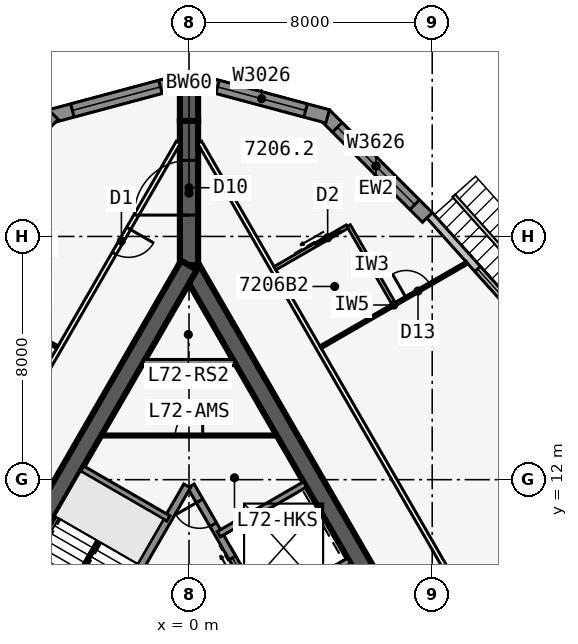
"""IFC4 building model, lengths in metres.
Left out: names, types, materials, properties, quantities, classifications, styles, units other than length and angle.
Written with IfcOpenShell. Run it as: python <this file> out.ifc"""

import sys

from ifc_helpers import new_model, si_unit, direction, frame, frame_2d, origin, place, context, subcontext, project, spatial, polyline, rectangle, outline, extrude, element, fill, save


model = new_model("IFC4")
c1 = context("Model", 3, precision=1e-05, world=origin(), true_north=direction((0.0, 1.0)))
c2 = subcontext(c1, "Body", "Model", "MODEL_VIEW")
j1 = project(units=[si_unit("LENGTHUNIT", "METRE"), si_unit("PLANEANGLEUNIT", "RADIAN")], contexts=[c1])
p1 = place(None, origin())
s1 = spatial("IfcSite", under=j1, at=p1, CompositionType="ELEMENT")
p2 = place(p1, origin())
s2 = spatial("IfcBuilding", under=s1, at=p2, CompositionType="ELEMENT")
p3 = place(p2, frame((0.0, 0.0, 271.7)))
s3 = spatial("IfcBuildingStorey", under=s2, at=p3, CompositionType="ELEMENT", Elevation=271.7)
p4 = place(p3, frame((16.5, -9.526, 0.0), z_axis=(0.0, 0.0, 1.0), x_axis=(-0.499999749417, 0.866025548458, 0.0)))
e1 = element("IfcWall", 1, at=p4, inside=s3, PredefinedType="SHEAR", context=c2, shape_type="SweptSolid", body=[
    extrude(rectangle(XDim=33.0, YDim=0.6, at=frame_2d((16.5, 0.0))), origin(), (0.0, 0.0, 1.0), 3.6),
])
p5 = place(p4, frame((14.15, 0.0, 0.0)))
e2 = element("IfcOpeningElement", 2, at=p5, cuts=e1, PredefinedType="OPENING", context=c2, shape_type="SweptSolid", body=[
    extrude(rectangle(XDim=1.8, YDim=2.13, at=frame_2d((0.9, 1.065))), frame((0.0, 0.31, 0.0), z_axis=(0.0, -1.0, 0.0), x_axis=(1.0, 0.0, 0.0)), (0.0, 0.0, 1.0), 0.62),
])
p6 = place(p4, frame((12.6, 0.0, 0.0)))
e3 = element("IfcOpeningElement", 3, at=p6, cuts=e1, PredefinedType="OPENING", context=c2, shape_type="SweptSolid", body=[
    extrude(rectangle(XDim=1.0, YDim=2.13, at=frame_2d((0.5, 1.065))), frame((0.0, 0.31, 0.0), z_axis=(0.0, -1.0, 0.0), x_axis=(1.0, 0.0, 0.0)), (0.0, 0.0, 1.0), 0.62),
])
p7 = place(p3, frame((5.379, 2.586, 0.0), z_axis=(0.0, 0.0, 1.0), x_axis=(-0.500001375892, 0.866024609411, 0.0)))
e4 = element("IfcWall", 4, at=p7, inside=s3, PredefinedType="SOLIDWALL", context=c2, shape_type="SweptSolid", body=[
    extrude(rectangle(XDim=10.633, YDim=0.25, at=frame_2d((5.316, 0.0))), origin(), (0.0, 0.0, 1.0), 3.35),
])
p8 = place(p7, frame((9.164, 0.0, 0.0)))
e5 = element("IfcOpeningElement", 5, at=p8, cuts=e4, PredefinedType="OPENING", context=c2, shape_type="SweptSolid", body=[
    extrude(rectangle(XDim=0.9, YDim=2.13, at=frame_2d((0.45, 1.065))), frame((0.0, 0.135, 0.0), z_axis=(0.0, -1.0, 0.0), x_axis=(1.0, 0.0, 0.0)), (0.0, 0.0, 1.0), 0.27),
])
p9 = place(p7, frame((1.0, 0.0, 0.0)))
e6 = element("IfcOpeningElement", 6, at=p9, cuts=e4, PredefinedType="OPENING", context=c2, shape_type="SweptSolid", body=[
    extrude(rectangle(XDim=1.1, YDim=2.13, at=frame_2d((0.55, 1.065))), frame((0.0, 0.135, 0.0), z_axis=(0.0, -1.0, 0.0), x_axis=(1.0, 0.0, 0.0)), (0.0, 0.0, 1.0), 0.27),
])
p10 = place(p7, frame((3.9, 0.0, 0.0)))
e7 = element("IfcOpeningElement", 7, at=p10, cuts=e4, PredefinedType="OPENING", context=c2, shape_type="SweptSolid", body=[
    extrude(rectangle(XDim=1.1, YDim=2.13, at=frame_2d((0.55, 1.065))), frame((0.0, 0.135, 0.0), z_axis=(0.0, -1.0, 0.0), x_axis=(1.0, 0.0, 0.0)), (0.0, 0.0, 1.0), 0.27),
])
p11 = place(p7, frame((6.8, 0.0, 0.0)))
e8 = element("IfcOpeningElement", 8, at=p11, cuts=e4, PredefinedType="OPENING", context=c2, shape_type="SweptSolid", body=[
    extrude(rectangle(XDim=1.1, YDim=2.13, at=frame_2d((0.55, 1.065))), frame((0.0, 0.135, 0.0), z_axis=(0.0, -1.0, 0.0), x_axis=(1.0, 0.0, 0.0)), (0.0, 0.0, 1.0), 0.27),
])
for number, where, z_axis, x_axis in (
    (9, (2.429, 7.696, 0.0), (0.0, 0.0, 1.0), (0.866, 0.5, 0.0)),
    (10, (0.979, 10.207, 0.0), (0.0, 0.0, 1.0), (0.866, 0.5, 0.0)),
):
    element("IfcWall", number, at=place(p3, frame(where, z_axis=z_axis, x_axis=x_axis)), inside=s3, PredefinedType="SOLIDWALL", context=c2, shape_type="SweptSolid", body=[
        extrude(rectangle(XDim=3.275, YDim=0.2, at=frame_2d((1.637, 0.0))), origin(), (0.0, 0.0, 1.0), 3.35),
    ])
p12 = place(p3, frame((0.0, 19.052, 0.0), z_axis=(0.0, 0.0, 1.0), x_axis=(-0.499999749417, -0.866025548458, 0.0)))
e11 = element("IfcWall", 11, at=p12, inside=s3, PredefinedType="SHEAR", context=c2, shape_type="SweptSolid", body=[
    extrude(rectangle(XDim=33.0, YDim=0.6, at=frame_2d((16.5, 0.0))), origin(), (0.0, 0.0, 1.0), 3.6),
])
p13 = place(p12, frame((14.15, 0.0, 0.0)))
e12 = element("IfcOpeningElement", 12, at=p13, cuts=e11, PredefinedType="OPENING", context=c2, shape_type="SweptSolid", body=[
    extrude(rectangle(XDim=1.8, YDim=2.13, at=frame_2d((0.9, 1.065))), frame((0.0, 0.31, 0.0), z_axis=(0.0, -1.0, 0.0), x_axis=(1.0, 0.0, 0.0)), (0.0, 0.0, 1.0), 0.62),
])
p14 = place(p12, frame((12.6, 0.0, 0.0)))
e13 = element("IfcOpeningElement", 13, at=p14, cuts=e11, PredefinedType="OPENING", context=c2, shape_type="SweptSolid", body=[
    extrude(rectangle(XDim=1.0, YDim=2.13, at=frame_2d((0.5, 1.065))), frame((0.0, 0.31, 0.0), z_axis=(0.0, -1.0, 0.0), x_axis=(1.0, 0.0, 0.0)), (0.0, 0.0, 1.0), 0.62),
])
p15 = place(p3, frame((-0.062, 11.794, 0.0), z_axis=(0.0, 0.0, 1.0), x_axis=(-0.500006680225, -0.86602154692, 0.0)))
e14 = element("IfcWall", 14, at=p15, inside=s3, PredefinedType="SOLIDWALL", context=c2, shape_type="SweptSolid", body=[
    extrude(rectangle(XDim=7.733, YDim=0.25, at=frame_2d((3.866, 0.0))), origin(), (0.0, 0.0, 1.0), 3.35),
])
p16 = place(p3, frame((-0.679, 10.727, 0.0), z_axis=(0.0, 0.0, 1.0), x_axis=(-0.866027924134, 0.499995634601, 0.0)))
e15 = element("IfcWall", 15, at=p16, inside=s3, PredefinedType="SOLIDWALL", context=c2, shape_type="SweptSolid", body=[
    extrude(rectangle(XDim=3.275, YDim=0.2, at=frame_2d((1.637, 0.0))), origin(), (0.0, 0.0, 1.0), 3.35),
])
p17 = place(p3, frame((0.0, 19.052, 0.0), z_axis=(0.0, 0.0, 1.0), x_axis=(0.0, 1.0, 0.0)))
e16 = element("IfcWall", 16, at=p17, inside=s3, PredefinedType="SHEAR", context=c2, shape_type="SweptSolid", body=[
    extrude(rectangle(XDim=4.746, YDim=0.6, at=frame_2d((2.373, 0.0))), origin(), (0.0, 0.0, 1.0), 3.6),
])
p18 = place(p17, frame((1.65, 0.0, 0.0)))
e17 = element("IfcOpeningElement", 17, at=p18, cuts=e16, PredefinedType="OPENING", context=c2, shape_type="SweptSolid", body=[
    extrude(rectangle(XDim=1.8, YDim=2.13, at=frame_2d((0.9, 1.065))), frame((0.0, 0.31, 0.0), z_axis=(0.0, -1.0, 0.0), x_axis=(1.0, 0.0, 0.0)), (0.0, 0.0, 1.0), 0.62),
])
p19 = place(p3, frame((0.0, 23.799, 0.0), z_axis=(0.0, 0.0, 1.0), x_axis=(0.0, 1.0, 0.0)))
e18 = element("IfcWall", 18, at=p19, inside=s3, PredefinedType="SHEAR", context=c2, shape_type="SweptSolid", body=[
    extrude(rectangle(XDim=1.155, YDim=0.6, at=frame_2d((0.577, 0.0))), origin(), (0.0, 0.0, 1.0), 3.6),
])
p20 = place(p3, frame((12.68, 15.374, 0.0), z_axis=(0.0, 0.0, 1.0), x_axis=(-0.667303550892, 0.744785855778, 0.0)))
e19 = element("IfcWall", 19, at=p20, inside=s3, PredefinedType="STANDARD", context=c2, shape_type="SweptSolid", body=[
    extrude(rectangle(XDim=7.153, YDim=0.25, at=frame_2d((3.576, 0.0))), origin(), (0.0, 0.0, 1.0), 3.35),
])
p21 = place(p20, frame((0.577, 0.0, 0.45)))
e20 = element("IfcOpeningElement", 20, at=p21, cuts=e19, PredefinedType="OPENING", context=c2, shape_type="SweptSolid", body=[
    extrude(rectangle(XDim=4.2, YDim=2.6, at=frame_2d((2.1, 1.3))), frame((0.0, 0.135, 0.0), z_axis=(0.0, -1.0, 0.0), x_axis=(1.0, 0.0, 0.0)), (0.0, 0.0, 1.0), 0.27),
])
p22 = place(p3, frame((7.841, 20.625, 0.0), z_axis=(0.0, 0.0, 1.0), x_axis=(-0.707106781187, 0.707106781187, 0.0)))
e21 = element("IfcWall", 21, at=p22, inside=s3, PredefinedType="SOLIDWALL", context=c2, shape_type="SweptSolid", body=[
    extrude(rectangle(XDim=4.781, YDim=0.45, at=frame_2d((2.391, 0.0))), origin(), (0.0, 0.0, 1.0), 3.35),
])
p23 = place(p22, frame((0.591, 0.0, 0.45)))
e22 = element("IfcOpeningElement", 22, at=p23, cuts=e21, PredefinedType="OPENING", context=c2, shape_type="SweptSolid", body=[
    extrude(rectangle(XDim=3.6, YDim=2.6, at=frame_2d((1.8, 1.3))), frame((0.0, 0.235, 0.0), z_axis=(0.0, -1.0, 0.0), x_axis=(1.0, 0.0, 0.0)), (0.0, 0.0, 1.0), 0.47),
])
p24 = place(p3, frame((4.561, 23.948, 0.0), z_axis=(0.0, 0.0, 1.0), x_axis=(-0.965926628191, 0.258816052347, 0.0)))
e23 = element("IfcWall", 23, at=p24, inside=s3, PredefinedType="SOLIDWALL", context=c2, shape_type="SweptSolid", body=[
    extrude(outline(polyline([(4.781, 0.225), (4.722, 0.225), (4.375, 0.132), (4.351, 0.225), (0.0, 0.225), (0.0, -0.225), (4.781, -0.225), (4.781, 0.225)])), origin(), (0.0, 0.0, 1.0), 3.35),
])
p25 = place(p24, frame((0.75, 0.0, 0.45)))
e24 = element("IfcOpeningElement", 24, at=p25, cuts=e23, PredefinedType="OPENING", context=c2, shape_type="SweptSolid", body=[
    extrude(rectangle(XDim=3.0, YDim=2.6, at=frame_2d((1.5, 1.3))), frame((0.0, 0.235, 0.0), z_axis=(0.0, -1.0, 0.0), x_axis=(1.0, 0.0, 0.0)), (0.0, 0.0, 1.0), 0.47),
])
p26 = place(p3, frame((0.058, 25.186, 0.0), z_axis=(0.0, 0.0, 1.0), x_axis=(-0.965926628191, -0.258816052347, 0.0)))
e25 = element("IfcWall", 25, at=p26, inside=s3, PredefinedType="SOLIDWALL", context=c2, shape_type="SweptSolid", body=[
    extrude(outline(polyline([(4.781, 0.225), (0.431, 0.225), (0.406, 0.132), (0.059, 0.225), (0.0, 0.225), (0.0, -0.225), (4.781, -0.225), (4.781, 0.225)])), origin(), (0.0, 0.0, 1.0), 3.35),
])
p27 = place(p26, frame((1.031, 0.0, 0.45)))
e26 = element("IfcOpeningElement", 26, at=p27, cuts=e25, PredefinedType="OPENING", context=c2, shape_type="SweptSolid", body=[
    extrude(rectangle(XDim=3.0, YDim=2.6, at=frame_2d((1.5, 1.3))), frame((0.0, 0.235, 0.0), z_axis=(0.0, -1.0, 0.0), x_axis=(1.0, 0.0, 0.0)), (0.0, 0.0, 1.0), 0.47),
])
p28 = place(p3, frame((-4.46, 24.007, 0.0), z_axis=(0.0, 0.0, 1.0), x_axis=(-0.707106781187, -0.707106781187, 0.0)))
e27 = element("IfcWall", 27, at=p28, inside=s3, PredefinedType="SOLIDWALL", context=c2, shape_type="SweptSolid", body=[
    extrude(rectangle(XDim=4.781, YDim=0.45, at=frame_2d((2.391, 0.0))), origin(), (0.0, 0.0, 1.0), 3.35),
])
p29 = place(p28, frame((0.591, 0.0, 0.45)))
e28 = element("IfcOpeningElement", 28, at=p29, cuts=e27, PredefinedType="OPENING", context=c2, shape_type="SweptSolid", body=[
    extrude(rectangle(XDim=3.6, YDim=2.6, at=frame_2d((1.8, 1.3))), frame((0.0, 0.235, 0.0), z_axis=(0.0, -1.0, 0.0), x_axis=(1.0, 0.0, 0.0)), (0.0, 0.0, 1.0), 0.47),
])
p30 = place(p3, frame((20.177, -11.245, 0.0), z_axis=(0.0, 0.0, 1.0), x_axis=(-0.499998875317, 0.866026053119, 0.0)))
e29 = element("IfcWall", 29, at=p30, inside=s3, PredefinedType="PARTITIONING", context=c2, shape_type="SweptSolid", body=[
    extrude(rectangle(XDim=39.654, YDim=0.15, at=frame_2d((19.827, 0.0))), origin(), (0.0, 0.0, 1.0), 3.35),
])
p31 = place(p30, frame((11.352, 0.0, 0.0)))
e30 = element("IfcOpeningElement", 30, at=p31, cuts=e29, PredefinedType="OPENING", context=c2, shape_type="SweptSolid", body=[
    extrude(rectangle(XDim=0.95, YDim=2.13, at=frame_2d((0.475, 1.065))), frame((0.0, 0.085, 0.0), z_axis=(0.0, -1.0, 0.0), x_axis=(1.0, 0.0, 0.0)), (0.0, 0.0, 1.0), 0.17),
])
p32 = place(p3, frame((4.329, 16.355, 0.0), z_axis=(0.0, 0.0, 1.0), x_axis=(0.866029066823, 0.499993655377, 0.0)))
e31 = element("IfcWall", 31, at=p32, inside=s3, PredefinedType="PARTITIONING", context=c2, shape_type="SweptSolid", body=[
    extrude(rectangle(XDim=5.559, YDim=0.1, at=frame_2d((2.779, 0.0))), origin(), (0.0, 0.0, 1.0), 2.301),
])
p33 = place(p32, frame((3.25, 0.0, 0.0)))
e32 = element("IfcOpeningElement", 32, at=p33, cuts=e31, PredefinedType="OPENING", context=c2, shape_type="SweptSolid", body=[
    extrude(rectangle(XDim=0.9, YDim=2.13, at=frame_2d((0.45, 1.065))), frame((0.0, 0.06, 0.0), z_axis=(0.0, -1.0, 0.0), x_axis=(1.0, 0.0, 0.0)), (0.0, 0.0, 1.0), 0.12),
])
p34 = place(p3, frame((6.753, 17.755, 0.0), z_axis=(0.0, 0.0, 1.0), x_axis=(-0.499990139034, 0.866031096941, 0.0)))
e33 = element("IfcWall", 33, at=p34, inside=s3, PredefinedType="PLUMBINGWALL", context=c2, shape_type="SweptSolid", body=[
    extrude(rectangle(XDim=3.0, YDim=0.12, at=frame_2d((1.5, 0.0))), origin(), (0.0, 0.0, 1.0), 3.35),
])
p35 = place(p3, frame((2.829, 18.954, 0.0), z_axis=(0.0, 0.0, 1.0), x_axis=(0.866035715982, 0.499982138324, 0.0)))
e34 = element("IfcWall", 34, at=p35, inside=s3, PredefinedType="PLUMBINGWALL", context=c2, shape_type="SweptSolid", body=[
    extrude(rectangle(XDim=2.74, YDim=0.12, at=frame_2d((1.37, 0.0))), origin(), (0.0, 0.0, 1.0), 3.35),
])
p36 = place(p35, frame((1.55, 0.0, 0.0)))
e35 = element("IfcOpeningElement", 35, at=p36, cuts=e34, PredefinedType="OPENING", context=c2, shape_type="SweptSolid", body=[
    extrude(rectangle(XDim=0.9, YDim=2.13, at=frame_2d((0.45, 1.065))), frame((0.0, 0.07, 0.0), z_axis=(0.0, -1.0, 0.0), x_axis=(1.0, 0.0, 0.0)), (0.0, 0.0, 1.0), 0.14),
])
p37 = place(p3, frame((-0.35, 23.096, 0.0), z_axis=(0.0, 0.0, 1.0), x_axis=(-0.499998875317, -0.866026053119, 0.0)))
e36 = element("IfcWall", 36, at=p37, inside=s3, PredefinedType="PARTITIONING", context=c2, shape_type="SweptSolid", body=[
    extrude(rectangle(XDim=39.654, YDim=0.15, at=frame_2d((19.827, 0.0))), origin(), (0.0, 0.0, 1.0), 3.35),
])
p38 = place(p37, frame((3.272, 0.0, 0.0)))
e37 = element("IfcOpeningElement", 37, at=p38, cuts=e36, PredefinedType="OPENING", context=c2, shape_type="SweptSolid", body=[
    extrude(rectangle(XDim=0.95, YDim=2.13, at=frame_2d((0.475, 1.065))), frame((0.0, 0.085, 0.0), z_axis=(0.0, -1.0, 0.0), x_axis=(1.0, 0.0, 0.0)), (0.0, 0.0, 1.0), 0.17),
])
p39 = place(p37, frame((19.052, 0.0, 0.0)))
e38 = element("IfcOpeningElement", 38, at=p39, cuts=e36, PredefinedType="OPENING", context=c2, shape_type="SweptSolid", body=[
    extrude(rectangle(XDim=0.95, YDim=2.13, at=frame_2d((0.475, 1.065))), frame((0.0, 0.085, 0.0), z_axis=(0.0, -1.0, 0.0), x_axis=(1.0, 0.0, 0.0)), (0.0, 0.0, 1.0), 0.17),
])
p40 = place(p37, frame((35.432, 0.0, 0.0)))
e39 = element("IfcOpeningElement", 39, at=p40, cuts=e36, PredefinedType="OPENING", context=c2, shape_type="SweptSolid", body=[
    extrude(rectangle(XDim=0.95, YDim=2.13, at=frame_2d((0.475, 1.065))), frame((0.0, 0.085, 0.0), z_axis=(0.0, -1.0, 0.0), x_axis=(1.0, 0.0, 0.0)), (0.0, 0.0, 1.0), 0.17),
])
p41 = place(p3, frame((-4.329, 16.355, 0.0), z_axis=(0.0, 0.0, 1.0), x_axis=(-0.866029066823, 0.499993655377, 0.0)))
e40 = element("IfcWall", 40, at=p41, inside=s3, PredefinedType="PARTITIONING", context=c2, shape_type="SweptSolid", body=[
    extrude(rectangle(XDim=5.559, YDim=0.1, at=frame_2d((2.779, 0.0))), origin(), (0.0, 0.0, 1.0), 2.301),
])
p42 = place(p41, frame((0.45, 0.0, 0.0)))
e41 = element("IfcOpeningElement", 41, at=p42, cuts=e40, PredefinedType="OPENING", context=c2, shape_type="SweptSolid", body=[
    extrude(rectangle(XDim=0.9, YDim=2.13, at=frame_2d((0.45, 1.065))), frame((0.0, 0.06, 0.0), z_axis=(0.0, -1.0, 0.0), x_axis=(1.0, 0.0, 0.0)), (0.0, 0.0, 1.0), 0.12),
])
p43 = place(p3, frame((-1.501, 15.853, 0.0), z_axis=(0.0, 0.0, 1.0), x_axis=(1.0, 0.0, 0.0)))
e42 = element("IfcWall", 42, at=p43, inside=s3, PredefinedType="SOLIDWALL", context=c2, shape_type="SweptSolid", body=[
    extrude(rectangle(XDim=3.002, YDim=0.2, at=frame_2d((1.501, 0.0))), origin(), (0.0, 0.0, 1.0), 3.35),
])
p44 = place(p3, frame((-2.887, 13.453, 0.0), z_axis=(0.0, 0.0, 1.0), x_axis=(1.0, 0.0, 0.0)))
e43 = element("IfcWall", 43, at=p44, inside=s3, PredefinedType="PARTITIONING", context=c2, shape_type="SweptSolid", body=[
    extrude(rectangle(XDim=5.773, YDim=0.1, at=frame_2d((2.887, 0.0))), origin(), (0.0, 0.0, 1.0), 3.35),
])
p45 = place(p44, frame((2.437, 0.0, 0.0)))
e44 = element("IfcOpeningElement", 44, at=p45, cuts=e43, PredefinedType="OPENING", context=c2, shape_type="SweptSolid", body=[
    extrude(rectangle(XDim=0.9, YDim=2.13, at=frame_2d((0.45, 1.065))), frame((0.0, 0.06, 0.0), z_axis=(0.0, -1.0, 0.0), x_axis=(1.0, 0.0, 0.0)), (0.0, 0.0, 1.0), 0.12),
])
p46 = place(p3, frame((-2.988, 9.978, 0.0), z_axis=(0.0, 0.0, 1.0), x_axis=(-0.499992232847, -0.866029888106, 0.0)))
e45 = element("IfcWall", 45, at=p46, inside=s3, PredefinedType="SOLIDWALL", context=c2, shape_type="SweptSolid", body=[
    extrude(rectangle(XDim=2.794, YDim=0.1, at=frame_2d((1.397, 0.0))), origin(), (0.0, 0.0, 1.0), 3.6),
])
p47 = place(p21, origin())
e46 = element("IfcWindow", 46, at=p47, inside=s3, PartitioningType="SINGLE_PANEL", PredefinedType="WINDOW", context=c2, shape_type="SweptSolid", body=[
    extrude(rectangle(XDim=4.2, YDim=2.6, at=frame_2d((2.1, 1.3))), frame((0.0, 0.03, 0.0), z_axis=(0.0, -1.0, 0.0), x_axis=(1.0, 0.0, 0.0)), (0.0, 0.0, 1.0), 0.06),
])
fill(e20, e46)
p48 = place(p23, origin())
e47 = element("IfcWindow", 47, at=p48, inside=s3, PartitioningType="SINGLE_PANEL", PredefinedType="WINDOW", context=c2, shape_type="SweptSolid", body=[
    extrude(rectangle(XDim=3.6, YDim=2.6, at=frame_2d((1.8, 1.3))), frame((0.0, 0.03, 0.0), z_axis=(0.0, -1.0, 0.0), x_axis=(1.0, 0.0, 0.0)), (0.0, 0.0, 1.0), 0.06),
])
fill(e22, e47)
p49 = place(p25, origin())
e48 = element("IfcWindow", 48, at=p49, inside=s3, PartitioningType="SINGLE_PANEL", PredefinedType="WINDOW", context=c2, shape_type="SweptSolid", body=[
    extrude(rectangle(XDim=3.0, YDim=2.6, at=frame_2d((1.5, 1.3))), frame((0.0, 0.03, 0.0), z_axis=(0.0, -1.0, 0.0), x_axis=(1.0, 0.0, 0.0)), (0.0, 0.0, 1.0), 0.06),
])
fill(e24, e48)
p50 = place(p27, origin())
e49 = element("IfcWindow", 49, at=p50, inside=s3, PartitioningType="SINGLE_PANEL", PredefinedType="WINDOW", context=c2, shape_type="SweptSolid", body=[
    extrude(rectangle(XDim=3.0, YDim=2.6, at=frame_2d((1.5, 1.3))), frame((0.0, 0.03, 0.0), z_axis=(0.0, -1.0, 0.0), x_axis=(1.0, 0.0, 0.0)), (0.0, 0.0, 1.0), 0.06),
])
fill(e26, e49)
p51 = place(p33, origin())
e50 = element("IfcDoor", 50, at=p51, inside=s3, OperationType="SINGLE_SWING_LEFT", PredefinedType="DOOR", context=c2, shape_type="SweptSolid", body=[
    extrude(rectangle(XDim=0.9, YDim=2.13, at=frame_2d((0.45, 1.065))), frame((0.0, 0.025, 0.0), z_axis=(0.0, -1.0, 0.0), x_axis=(1.0, 0.0, 0.0)), (0.0, 0.0, 1.0), 0.05),
])
fill(e32, e50)
p52 = place(p36, origin())
e51 = element("IfcDoor", 51, at=p52, inside=s3, OperationType="SLIDING_TO_LEFT", PredefinedType="DOOR", context=c2, shape_type="SweptSolid", body=[
    extrude(rectangle(XDim=0.9, YDim=2.13, at=frame_2d((0.45, 1.065))), frame((0.0, 0.025, 0.0), z_axis=(0.0, -1.0, 0.0), x_axis=(1.0, 0.0, 0.0)), (0.0, 0.0, 1.0), 0.05),
])
fill(e35, e51)
p53 = place(p38, origin())
e52 = element("IfcDoor", 52, at=p53, inside=s3, OperationType="SINGLE_SWING_LEFT", PredefinedType="DOOR", context=c2, shape_type="SweptSolid", body=[
    extrude(rectangle(XDim=0.95, YDim=2.13, at=frame_2d((0.475, 1.065))), frame((0.0, 0.025, 0.0), z_axis=(0.0, -1.0, 0.0), x_axis=(1.0, 0.0, 0.0)), (0.0, 0.0, 1.0), 0.05),
])
fill(e37, e52)
p54 = place(p18, origin())
e53 = element("IfcDoor", 53, at=p54, inside=s3, OperationType="DOUBLE_DOOR_DOUBLE_SWING", PredefinedType="DOOR", context=c2, shape_type="SweptSolid", body=[
    extrude(rectangle(XDim=1.8, YDim=2.13, at=frame_2d((0.9, 1.065))), frame((0.0, 0.025, 0.0), z_axis=(0.0, -1.0, 0.0), x_axis=(1.0, 0.0, 0.0)), (0.0, 0.0, 1.0), 0.05),
])
fill(e17, e53)
p55 = place(p45, origin())
e54 = element("IfcDoor", 54, at=p55, inside=s3, OperationType="SINGLE_SWING_RIGHT", PredefinedType="DOOR", context=c2, shape_type="SweptSolid", body=[
    extrude(rectangle(XDim=0.9, YDim=2.13, at=frame_2d((0.45, 1.065))), frame((0.0, 0.025, 0.0), z_axis=(0.0, -1.0, 0.0), x_axis=(1.0, 0.0, 0.0)), (0.0, 0.0, 1.0), 0.05),
])
fill(e44, e54)
p56 = place(p8, origin())
e55 = element("IfcDoor", 55, at=p56, inside=s3, OperationType="SINGLE_SWING_RIGHT", PredefinedType="DOOR", context=c2, shape_type="SweptSolid", body=[
    extrude(rectangle(XDim=0.9, YDim=2.13, at=frame_2d((0.45, 1.065))), frame((0.0, 0.025, 0.0), z_axis=(0.0, -1.0, 0.0), x_axis=(1.0, 0.0, 0.0)), (0.0, 0.0, 1.0), 0.05),
])
fill(e5, e55)
p57 = place(p11, origin())
e56 = element("IfcDoor", 56, at=p57, inside=s3, OperationType="DOUBLE_DOOR_SLIDING", PredefinedType="USERDEFINED", context=c2, shape_type="SweptSolid", body=[
    extrude(rectangle(XDim=1.1, YDim=2.13, at=frame_2d((0.55, 1.065))), frame((0.0, 0.025, 0.0), z_axis=(0.0, -1.0, 0.0), x_axis=(1.0, 0.0, 0.0)), (0.0, 0.0, 1.0), 0.05),
])
fill(e8, e56)
save(model, sys.argv[1])
